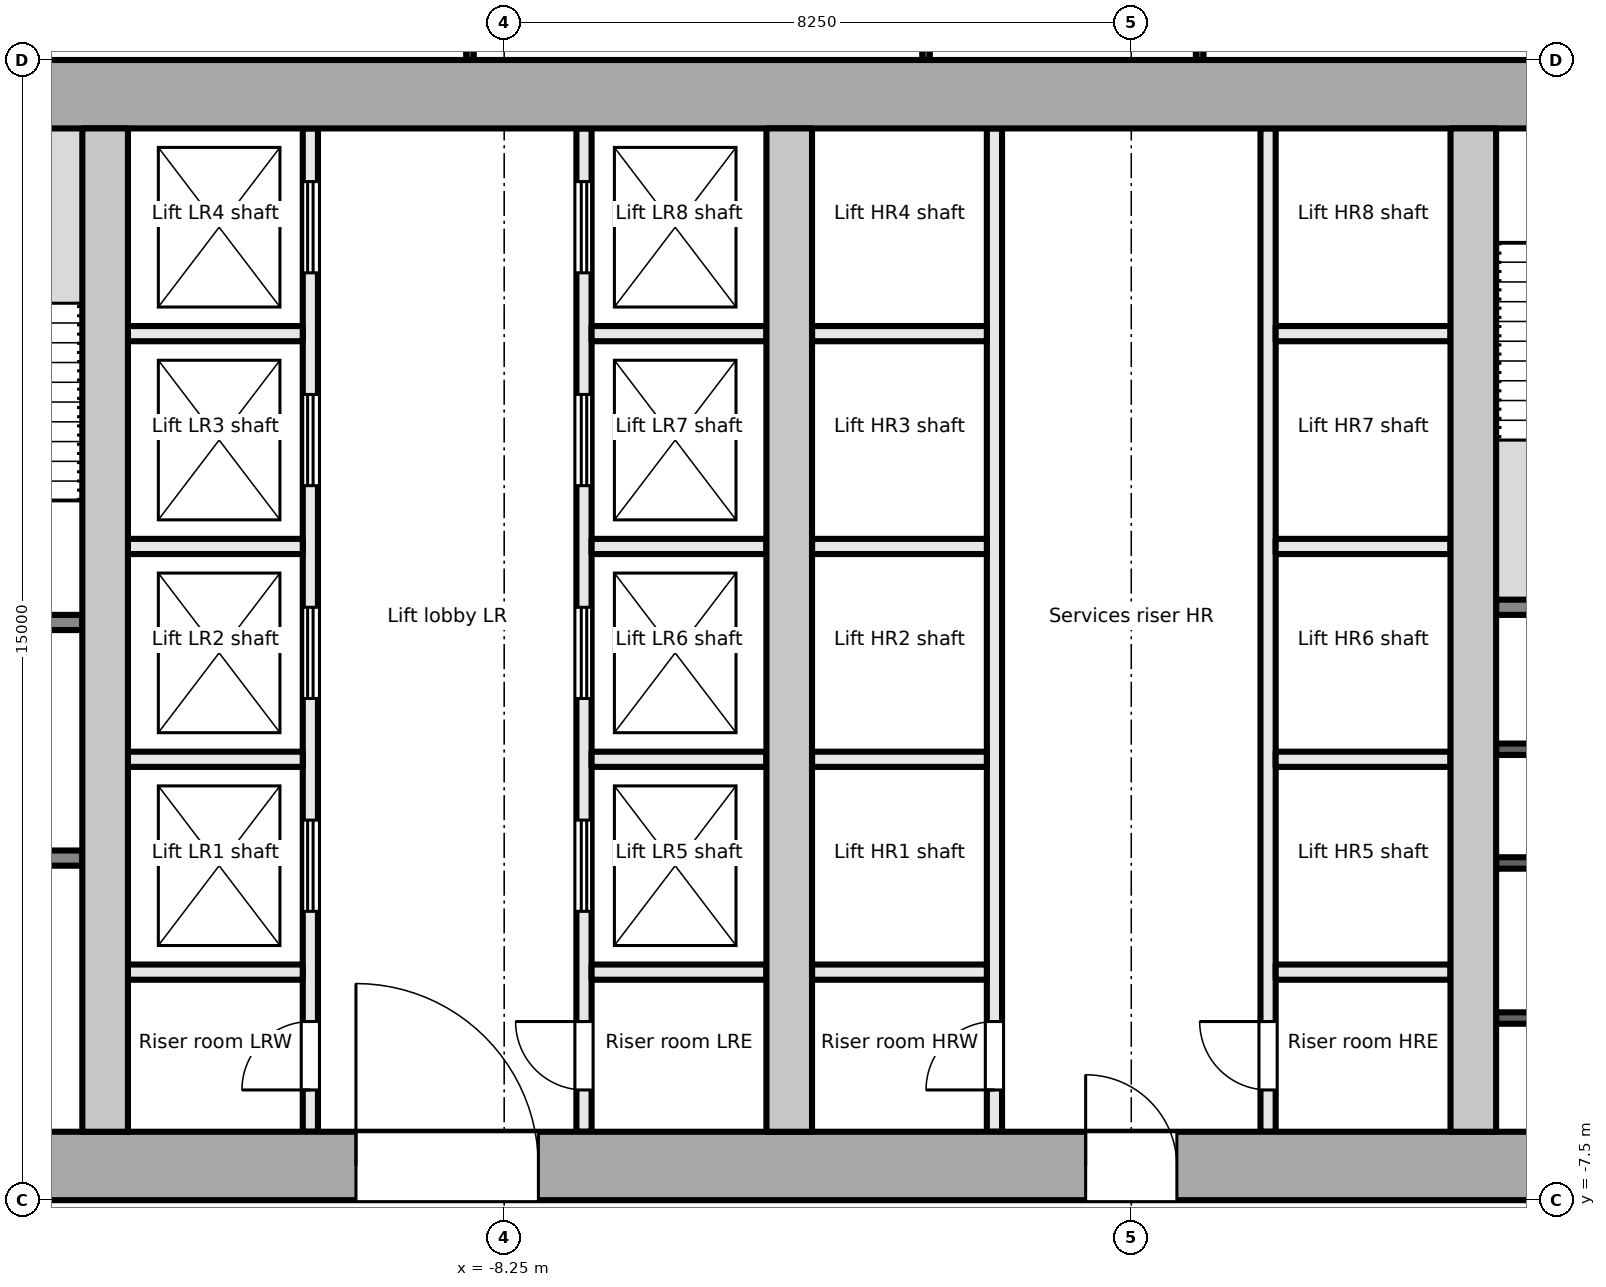
"""IFC4 building model, lengths in metres.
Left out: names, types, materials, properties, quantities, classifications, styles, units other than length and angle.
Written with IfcOpenShell. Run it as: python <this file> out.ifc"""

import sys

from ifc_helpers import new_model, si_unit, direction, frame, frame_2d, origin, place, context, subcontext, project, spatial, rectangle, extrude, element, fill, save


model = new_model("IFC4")
c1 = context("Model", 3, precision=1e-05, world=origin(), true_north=direction((0.0, 1.0)))
c2 = subcontext(c1, "Body", "Model", "MODEL_VIEW")
j1 = project(units=[si_unit("LENGTHUNIT", "METRE"), si_unit("PLANEANGLEUNIT", "RADIAN")], contexts=[c1])
p1 = place(None, origin())
s1 = spatial("IfcSite", under=j1, at=p1, CompositionType="ELEMENT")
p2 = place(p1, origin())
s2 = spatial("IfcBuilding", under=s1, at=p2, CompositionType="ELEMENT")
p3 = place(p2, frame((0.0, 0.0, 126.1)))
s3 = spatial("IfcBuildingStorey", under=s2, at=p3, CompositionType="ELEMENT", Elevation=126.1)
p4 = place(p3, frame((-18.0, -7.05, -0.2), z_axis=(0.0, 0.0, 1.0), x_axis=(1.0, 0.0, 0.0)))
e1 = element("IfcWall", 1, at=p4, inside=s3, PredefinedType="SHEAR", context=c2, shape_type="SweptSolid", body=[
    extrude(rectangle(XDim=36.0, YDim=0.9, at=frame_2d((18.0, 0.0))), origin(), (0.0, 0.0, 1.0), 4.0),
])
p5 = place(p4, frame((7.8, 0.0, 0.2)))
e2 = element("IfcOpeningElement", 2, at=p5, cuts=e1, PredefinedType="OPENING", context=c2, shape_type="SweptSolid", body=[
    extrude(rectangle(XDim=2.4, YDim=2.1, at=frame_2d((1.2, 1.05))), frame((0.0, 0.46, 0.0), z_axis=(0.0, -1.0, 0.0), x_axis=(1.0, 0.0, 0.0)), (0.0, 0.0, 1.0), 0.921),
])
p6 = place(p4, frame((17.4, 0.0, 0.2)))
e3 = element("IfcOpeningElement", 3, at=p6, cuts=e1, PredefinedType="OPENING", context=c2, shape_type="SweptSolid", body=[
    extrude(rectangle(XDim=1.2, YDim=2.1, at=frame_2d((0.6, 1.05))), frame((0.0, 0.46, 0.0), z_axis=(0.0, -1.0, 0.0), x_axis=(1.0, 0.0, 0.0)), (0.0, 0.0, 1.0), 0.921),
])
p7 = place(p4, frame((26.1, 0.0, 0.2)))
e4 = element("IfcOpeningElement", 4, at=p7, cuts=e1, PredefinedType="OPENING", context=c2, shape_type="SweptSolid", body=[
    extrude(rectangle(XDim=2.4, YDim=2.1, at=frame_2d((1.2, 1.05))), frame((0.0, 0.46, 0.0), z_axis=(0.0, -1.0, 0.0), x_axis=(1.0, 0.0, 0.0)), (0.0, 0.0, 1.0), 0.921),
])
p8 = place(p3, frame((-18.0, 7.05, -0.2), z_axis=(0.0, 0.0, 1.0), x_axis=(1.0, 0.0, 0.0)))
e5 = element("IfcWall", 5, at=p8, inside=s3, PredefinedType="SHEAR", context=c2, shape_type="SweptSolid", body=[
    extrude(rectangle(XDim=36.0, YDim=0.9, at=frame_2d((18.0, 0.0))), origin(), (0.0, 0.0, 1.0), 4.0),
])
for number, where, z_axis, x_axis in (
    (6, (-13.5, -6.6, -0.2), (0.0, 0.0, 1.0), (0.0, 1.0, 0.0)),
    (7, (-4.5, -6.6, -0.2), (0.0, 0.0, 1.0), (0.0, 1.0, 0.0)),
    (8, (4.5, -6.6, -0.2), (0.0, 0.0, 1.0), (0.0, 1.0, 0.0)),
):
    element("IfcWall", number, at=place(p3, frame(where, z_axis=z_axis, x_axis=x_axis)), inside=s3, PredefinedType="SHEAR", context=c2, shape_type="SweptSolid", body=[
        extrude(rectangle(XDim=13.2, YDim=0.6, at=frame_2d((6.6, 0.0))), origin(), (0.0, 0.0, 1.0), 4.0),
    ])
p9 = place(p3, frame((-17.1, -3.0, 0.0), z_axis=(0.0, 0.0, 1.0), x_axis=(1.0, 0.0, 0.0)))
e9 = element("IfcWall", 9, at=p9, inside=s3, PredefinedType="PARTITIONING", context=c2, shape_type="SweptSolid", body=[
    extrude(rectangle(XDim=3.3, YDim=0.2, at=frame_2d((1.65, 0.0))), origin(), (0.0, 0.0, 1.0), 3.8),
])
p10 = place(p9, frame((1.1, 0.0, 0.0)))
e10 = element("IfcOpeningElement", 10, at=p10, cuts=e9, PredefinedType="OPENING", context=c2, shape_type="SweptSolid", body=[
    extrude(rectangle(XDim=1.1, YDim=2.1, at=frame_2d((0.55, 1.05))), frame((0.0, 0.111, 0.0), z_axis=(0.0, -1.0, 0.0), x_axis=(1.0, 0.0, 0.0)), (0.0, 0.0, 1.0), 0.221),
])
p11 = place(p3, frame((-17.1, 0.1, 0.0), z_axis=(0.0, 0.0, 1.0), x_axis=(1.0, 0.0, 0.0)))
e11 = element("IfcWall", 11, at=p11, inside=s3, PredefinedType="PARTITIONING", context=c2, shape_type="SweptSolid", body=[
    extrude(rectangle(XDim=3.3, YDim=0.2, at=frame_2d((1.65, 0.0))), origin(), (0.0, 0.0, 1.0), 3.8),
])
p12 = place(p11, frame((1.1, 0.0, 0.0)))
e12 = element("IfcOpeningElement", 12, at=p12, cuts=e11, PredefinedType="OPENING", context=c2, shape_type="SweptSolid", body=[
    extrude(rectangle(XDim=1.1, YDim=2.1, at=frame_2d((0.55, 1.05))), frame((0.0, 0.111, 0.0), z_axis=(0.0, -1.0, 0.0), x_axis=(1.0, 0.0, 0.0)), (0.0, 0.0, 1.0), 0.221),
])
p13 = place(p3, frame((-10.8, -6.6, 0.0), z_axis=(0.0, 0.0, 1.0), x_axis=(0.0, 1.0, 0.0)))
e13 = element("IfcWall", 13, at=p13, inside=s3, PredefinedType="PARTITIONING", context=c2, shape_type="SweptSolid", body=[
    extrude(rectangle(XDim=13.2, YDim=0.2, at=frame_2d((6.6, 0.0))), origin(), (0.0, 0.0, 1.0), 3.8),
])
p14 = place(p13, frame((0.55, 0.0, 0.0)))
e14 = element("IfcOpeningElement", 14, at=p14, cuts=e13, PredefinedType="OPENING", context=c2, shape_type="SweptSolid", body=[
    extrude(rectangle(XDim=0.9, YDim=2.1, at=frame_2d((0.45, 1.05))), frame((0.0, 0.111, 0.0), z_axis=(0.0, -1.0, 0.0), x_axis=(1.0, 0.0, 0.0)), (0.0, 0.0, 1.0), 0.221),
])
p15 = place(p13, frame((2.9, 0.0, 0.0)))
e15 = element("IfcOpeningElement", 15, at=p15, cuts=e13, PredefinedType="OPENING", context=c2, shape_type="SweptSolid", body=[
    extrude(rectangle(XDim=1.2, YDim=2.1, at=frame_2d((0.6, 1.05))), frame((0.0, 0.111, 0.0), z_axis=(0.0, -1.0, 0.0), x_axis=(1.0, 0.0, 0.0)), (0.0, 0.0, 1.0), 0.221),
])
p16 = place(p13, frame((5.7, 0.0, 0.0)))
e16 = element("IfcOpeningElement", 16, at=p16, cuts=e13, PredefinedType="OPENING", context=c2, shape_type="SweptSolid", body=[
    extrude(rectangle(XDim=1.2, YDim=2.1, at=frame_2d((0.6, 1.05))), frame((0.0, 0.111, 0.0), z_axis=(0.0, -1.0, 0.0), x_axis=(1.0, 0.0, 0.0)), (0.0, 0.0, 1.0), 0.221),
])
p17 = place(p13, frame((8.5, 0.0, 0.0)))
e17 = element("IfcOpeningElement", 17, at=p17, cuts=e13, PredefinedType="OPENING", context=c2, shape_type="SweptSolid", body=[
    extrude(rectangle(XDim=1.2, YDim=2.1, at=frame_2d((0.6, 1.05))), frame((0.0, 0.111, 0.0), z_axis=(0.0, -1.0, 0.0), x_axis=(1.0, 0.0, 0.0)), (0.0, 0.0, 1.0), 0.221),
])
p18 = place(p13, frame((11.3, 0.0, 0.0)))
e18 = element("IfcOpeningElement", 18, at=p18, cuts=e13, PredefinedType="OPENING", context=c2, shape_type="SweptSolid", body=[
    extrude(rectangle(XDim=1.2, YDim=2.1, at=frame_2d((0.6, 1.05))), frame((0.0, 0.111, 0.0), z_axis=(0.0, -1.0, 0.0), x_axis=(1.0, 0.0, 0.0)), (0.0, 0.0, 1.0), 0.221),
])
p19 = place(p3, frame((-7.2, -6.6, 0.0), z_axis=(0.0, 0.0, 1.0), x_axis=(0.0, 1.0, 0.0)))
e19 = element("IfcWall", 19, at=p19, inside=s3, PredefinedType="PARTITIONING", context=c2, shape_type="SweptSolid", body=[
    extrude(rectangle(XDim=13.2, YDim=0.2, at=frame_2d((6.6, 0.0))), origin(), (0.0, 0.0, 1.0), 3.8),
])
p20 = place(p19, frame((0.55, 0.0, 0.0)))
e20 = element("IfcOpeningElement", 20, at=p20, cuts=e19, PredefinedType="OPENING", context=c2, shape_type="SweptSolid", body=[
    extrude(rectangle(XDim=0.9, YDim=2.1, at=frame_2d((0.45, 1.05))), frame((0.0, 0.111, 0.0), z_axis=(0.0, -1.0, 0.0), x_axis=(1.0, 0.0, 0.0)), (0.0, 0.0, 1.0), 0.221),
])
p21 = place(p19, frame((2.9, 0.0, 0.0)))
e21 = element("IfcOpeningElement", 21, at=p21, cuts=e19, PredefinedType="OPENING", context=c2, shape_type="SweptSolid", body=[
    extrude(rectangle(XDim=1.2, YDim=2.1, at=frame_2d((0.6, 1.05))), frame((0.0, 0.111, 0.0), z_axis=(0.0, -1.0, 0.0), x_axis=(1.0, 0.0, 0.0)), (0.0, 0.0, 1.0), 0.221),
])
p22 = place(p19, frame((5.7, 0.0, 0.0)))
e22 = element("IfcOpeningElement", 22, at=p22, cuts=e19, PredefinedType="OPENING", context=c2, shape_type="SweptSolid", body=[
    extrude(rectangle(XDim=1.2, YDim=2.1, at=frame_2d((0.6, 1.05))), frame((0.0, 0.111, 0.0), z_axis=(0.0, -1.0, 0.0), x_axis=(1.0, 0.0, 0.0)), (0.0, 0.0, 1.0), 0.221),
])
p23 = place(p19, frame((8.5, 0.0, 0.0)))
e23 = element("IfcOpeningElement", 23, at=p23, cuts=e19, PredefinedType="OPENING", context=c2, shape_type="SweptSolid", body=[
    extrude(rectangle(XDim=1.2, YDim=2.1, at=frame_2d((0.6, 1.05))), frame((0.0, 0.111, 0.0), z_axis=(0.0, -1.0, 0.0), x_axis=(1.0, 0.0, 0.0)), (0.0, 0.0, 1.0), 0.221),
])
p24 = place(p19, frame((11.3, 0.0, 0.0)))
e24 = element("IfcOpeningElement", 24, at=p24, cuts=e19, PredefinedType="OPENING", context=c2, shape_type="SweptSolid", body=[
    extrude(rectangle(XDim=1.2, YDim=2.1, at=frame_2d((0.6, 1.05))), frame((0.0, 0.111, 0.0), z_axis=(0.0, -1.0, 0.0), x_axis=(1.0, 0.0, 0.0)), (0.0, 0.0, 1.0), 0.221),
])
for number, where, z_axis, x_axis in (
    (25, (-13.2, -1.7, 0.0), (0.0, 0.0, 1.0), (1.0, 0.0, 0.0)),
    (26, (-13.2, 1.1, 0.0), (0.0, 0.0, 1.0), (1.0, 0.0, 0.0)),
    (27, (-13.2, 3.9, 0.0), (0.0, 0.0, 1.0), (1.0, 0.0, 0.0)),
    (28, (-13.2, -4.5, 0.0), (0.0, 0.0, 1.0), (1.0, 0.0, 0.0)),
    (29, (-7.1, -1.7, 0.0), (0.0, 0.0, 1.0), (1.0, 0.0, 0.0)),
    (30, (-7.1, 1.1, 0.0), (0.0, 0.0, 1.0), (1.0, 0.0, 0.0)),
    (31, (-7.1, 3.9, 0.0), (0.0, 0.0, 1.0), (1.0, 0.0, 0.0)),
    (32, (-7.1, -4.5, 0.0), (0.0, 0.0, 1.0), (1.0, 0.0, 0.0)),
):
    element("IfcWall", number, at=place(p3, frame(where, z_axis=z_axis, x_axis=x_axis)), inside=s3, PredefinedType="PARTITIONING", context=c2, shape_type="SweptSolid", body=[
        extrude(rectangle(XDim=2.3, YDim=0.2, at=frame_2d((1.15, 0.0))), origin(), (0.0, 0.0, 1.0), 3.8),
    ])
p25 = place(p3, frame((-1.8, -6.6, 0.0), z_axis=(0.0, 0.0, 1.0), x_axis=(0.0, 1.0, 0.0)))
e33 = element("IfcWall", 33, at=p25, inside=s3, PredefinedType="PARTITIONING", context=c2, shape_type="SweptSolid", body=[
    extrude(rectangle(XDim=13.2, YDim=0.2, at=frame_2d((6.6, 0.0))), origin(), (0.0, 0.0, 1.0), 3.8),
])
p26 = place(p25, frame((0.55, 0.0, 0.0)))
e34 = element("IfcOpeningElement", 34, at=p26, cuts=e33, PredefinedType="OPENING", context=c2, shape_type="SweptSolid", body=[
    extrude(rectangle(XDim=0.9, YDim=2.1, at=frame_2d((0.45, 1.05))), frame((0.0, 0.111, 0.0), z_axis=(0.0, -1.0, 0.0), x_axis=(1.0, 0.0, 0.0)), (0.0, 0.0, 1.0), 0.221),
])
p27 = place(p3, frame((1.8, -6.6, 0.0), z_axis=(0.0, 0.0, 1.0), x_axis=(0.0, 1.0, 0.0)))
e35 = element("IfcWall", 35, at=p27, inside=s3, PredefinedType="PARTITIONING", context=c2, shape_type="SweptSolid", body=[
    extrude(rectangle(XDim=13.2, YDim=0.2, at=frame_2d((6.6, 0.0))), origin(), (0.0, 0.0, 1.0), 3.8),
])
p28 = place(p27, frame((0.55, 0.0, 0.0)))
e36 = element("IfcOpeningElement", 36, at=p28, cuts=e35, PredefinedType="OPENING", context=c2, shape_type="SweptSolid", body=[
    extrude(rectangle(XDim=0.9, YDim=2.1, at=frame_2d((0.45, 1.05))), frame((0.0, 0.111, 0.0), z_axis=(0.0, -1.0, 0.0), x_axis=(1.0, 0.0, 0.0)), (0.0, 0.0, 1.0), 0.221),
])
for number, where, z_axis, x_axis in (
    (37, (-4.2, -1.7, 0.0), (0.0, 0.0, 1.0), (1.0, 0.0, 0.0)),
    (38, (-4.2, 1.1, 0.0), (0.0, 0.0, 1.0), (1.0, 0.0, 0.0)),
    (39, (-4.2, 3.9, 0.0), (0.0, 0.0, 1.0), (1.0, 0.0, 0.0)),
    (40, (-4.2, -4.5, 0.0), (0.0, 0.0, 1.0), (1.0, 0.0, 0.0)),
    (41, (1.9, -1.7, 0.0), (0.0, 0.0, 1.0), (1.0, 0.0, 0.0)),
    (42, (1.9, 1.1, 0.0), (0.0, 0.0, 1.0), (1.0, 0.0, 0.0)),
    (43, (1.9, 3.9, 0.0), (0.0, 0.0, 1.0), (1.0, 0.0, 0.0)),
    (44, (1.9, -4.5, 0.0), (0.0, 0.0, 1.0), (1.0, 0.0, 0.0)),
):
    element("IfcWall", number, at=place(p3, frame(where, z_axis=z_axis, x_axis=x_axis)), inside=s3, PredefinedType="PARTITIONING", context=c2, shape_type="SweptSolid", body=[
        extrude(rectangle(XDim=2.3, YDim=0.2, at=frame_2d((1.15, 0.0))), origin(), (0.0, 0.0, 1.0), 3.8),
    ])
p29 = place(p3, frame((4.8, 0.3, 0.0), z_axis=(0.0, 0.0, 1.0), x_axis=(1.0, 0.0, 0.0)))
e45 = element("IfcWall", 45, at=p29, inside=s3, PredefinedType="PARTITIONING", context=c2, shape_type="SweptSolid", body=[
    extrude(rectangle(XDim=3.15, YDim=0.2, at=frame_2d((1.575, 0.0))), origin(), (0.0, 0.0, 1.0), 3.8),
])
for number, where, z_axis, x_axis in (
    (46, (4.8, -5.104, 0.0), (0.0, 0.0, 1.0), (1.0, 0.0, 0.0)),
    (47, (4.8, -3.064, 0.0), (0.0, 0.0, 1.0), (1.0, 0.0, 0.0)),
    (48, (4.8, -1.568, 0.0), (0.0, 0.0, 1.0), (1.0, 0.0, 0.0)),
):
    element("IfcWall", number, at=place(p3, frame(where, z_axis=z_axis, x_axis=x_axis)), inside=s3, PredefinedType="PARTITIONING", context=c2, shape_type="SweptSolid", body=[
        extrude(rectangle(XDim=3.15, YDim=0.15, at=frame_2d((1.575, 0.0))), origin(), (0.0, 0.0, 1.0), 3.8),
    ])
p30 = place(p3, frame((-8.7, 7.5, 0.0), z_axis=(0.0, 0.0, 1.0), x_axis=(0.0, 1.0, 0.0)))
e49 = element("IfcWall", 49, at=p30, inside=s3, PredefinedType="PARTITIONING", context=c2, shape_type="SweptSolid", body=[
    extrude(rectangle(XDim=2.95, YDim=0.1, at=frame_2d((1.475, 0.0))), origin(), (0.0, 0.0, 1.0), 3.8),
])
p31 = place(p30, frame((0.575, 0.0, 0.9)))
e50 = element("IfcOpeningElement", 50, at=p31, cuts=e49, PredefinedType="OPENING", context=c2, shape_type="SweptSolid", body=[
    extrude(rectangle(XDim=1.8, YDim=1.2, at=frame_2d((0.9, 0.6))), frame((0.0, 0.061, 0.0), z_axis=(0.0, -1.0, 0.0), x_axis=(1.0, 0.0, 0.0)), (0.0, 0.0, 1.0), 0.121),
])
for number, where, z_axis, x_axis in (
    (51, (-2.7, 10.45, 0.0), (0.0, 0.0, 1.0), (0.0, -1.0, 0.0)),
    (52, (0.9, 10.45, 0.0), (0.0, 0.0, 1.0), (0.0, -1.0, 0.0)),
):
    element("IfcWall", number, at=place(p3, frame(where, z_axis=z_axis, x_axis=x_axis)), inside=s3, PredefinedType="PARTITIONING", context=c2, shape_type="SweptSolid", body=[
        extrude(rectangle(XDim=2.95, YDim=0.1, at=frame_2d((1.475, 0.0))), origin(), (0.0, 0.0, 1.0), 3.8),
    ])
p32 = place(p14, origin())
e53 = element("IfcDoor", 53, at=p32, inside=s3, OperationType="SINGLE_SWING_LEFT", PredefinedType="DOOR", context=c2, shape_type="SweptSolid", body=[
    extrude(rectangle(XDim=0.9, YDim=2.1, at=frame_2d((0.45, 1.05))), frame((0.0, 0.025, 0.0), z_axis=(0.0, -1.0, 0.0), x_axis=(1.0, 0.0, 0.0)), (0.0, 0.0, 1.0), 0.05),
])
fill(e14, e53)
p33 = place(p15, origin())
e54 = element("IfcDoor", 54, at=p33, inside=s3, OperationType="DOUBLE_DOOR_SLIDING", PredefinedType="DOOR", context=c2, shape_type="SweptSolid", body=[
    extrude(rectangle(XDim=1.2, YDim=2.1, at=frame_2d((0.6, 1.05))), frame((0.0, 0.025, 0.0), z_axis=(0.0, -1.0, 0.0), x_axis=(1.0, 0.0, 0.0)), (0.0, 0.0, 1.0), 0.05),
])
fill(e15, e54)
p34 = place(p16, origin())
e55 = element("IfcDoor", 55, at=p34, inside=s3, OperationType="DOUBLE_DOOR_SLIDING", PredefinedType="DOOR", context=c2, shape_type="SweptSolid", body=[
    extrude(rectangle(XDim=1.2, YDim=2.1, at=frame_2d((0.6, 1.05))), frame((0.0, 0.025, 0.0), z_axis=(0.0, -1.0, 0.0), x_axis=(1.0, 0.0, 0.0)), (0.0, 0.0, 1.0), 0.05),
])
fill(e16, e55)
p35 = place(p17, origin())
e56 = element("IfcDoor", 56, at=p35, inside=s3, OperationType="DOUBLE_DOOR_SLIDING", PredefinedType="DOOR", context=c2, shape_type="SweptSolid", body=[
    extrude(rectangle(XDim=1.2, YDim=2.1, at=frame_2d((0.6, 1.05))), frame((0.0, 0.025, 0.0), z_axis=(0.0, -1.0, 0.0), x_axis=(1.0, 0.0, 0.0)), (0.0, 0.0, 1.0), 0.05),
])
fill(e17, e56)
p36 = place(p18, origin())
e57 = element("IfcDoor", 57, at=p36, inside=s3, OperationType="DOUBLE_DOOR_SLIDING", PredefinedType="DOOR", context=c2, shape_type="SweptSolid", body=[
    extrude(rectangle(XDim=1.2, YDim=2.1, at=frame_2d((0.6, 1.05))), frame((0.0, 0.025, 0.0), z_axis=(0.0, -1.0, 0.0), x_axis=(1.0, 0.0, 0.0)), (0.0, 0.0, 1.0), 0.05),
])
fill(e18, e57)
p37 = place(p20, origin())
e58 = element("IfcDoor", 58, at=p37, inside=s3, OperationType="SINGLE_SWING_RIGHT", PredefinedType="DOOR", context=c2, shape_type="SweptSolid", body=[
    extrude(rectangle(XDim=0.9, YDim=2.1, at=frame_2d((0.45, 1.05))), frame((0.0, 0.025, 0.0), z_axis=(0.0, -1.0, 0.0), x_axis=(1.0, 0.0, 0.0)), (0.0, 0.0, 1.0), 0.05),
])
fill(e20, e58)
p38 = place(p21, origin())
e59 = element("IfcDoor", 59, at=p38, inside=s3, OperationType="DOUBLE_DOOR_SLIDING", PredefinedType="DOOR", context=c2, shape_type="SweptSolid", body=[
    extrude(rectangle(XDim=1.2, YDim=2.1, at=frame_2d((0.6, 1.05))), frame((0.0, 0.025, 0.0), z_axis=(0.0, -1.0, 0.0), x_axis=(1.0, 0.0, 0.0)), (0.0, 0.0, 1.0), 0.05),
])
fill(e21, e59)
p39 = place(p22, origin())
e60 = element("IfcDoor", 60, at=p39, inside=s3, OperationType="DOUBLE_DOOR_SLIDING", PredefinedType="DOOR", context=c2, shape_type="SweptSolid", body=[
    extrude(rectangle(XDim=1.2, YDim=2.1, at=frame_2d((0.6, 1.05))), frame((0.0, 0.025, 0.0), z_axis=(0.0, -1.0, 0.0), x_axis=(1.0, 0.0, 0.0)), (0.0, 0.0, 1.0), 0.05),
])
fill(e22, e60)
p40 = place(p23, origin())
e61 = element("IfcDoor", 61, at=p40, inside=s3, OperationType="DOUBLE_DOOR_SLIDING", PredefinedType="DOOR", context=c2, shape_type="SweptSolid", body=[
    extrude(rectangle(XDim=1.2, YDim=2.1, at=frame_2d((0.6, 1.05))), frame((0.0, 0.025, 0.0), z_axis=(0.0, -1.0, 0.0), x_axis=(1.0, 0.0, 0.0)), (0.0, 0.0, 1.0), 0.05),
])
fill(e23, e61)
p41 = place(p24, origin())
e62 = element("IfcDoor", 62, at=p41, inside=s3, OperationType="DOUBLE_DOOR_SLIDING", PredefinedType="DOOR", context=c2, shape_type="SweptSolid", body=[
    extrude(rectangle(XDim=1.2, YDim=2.1, at=frame_2d((0.6, 1.05))), frame((0.0, 0.025, 0.0), z_axis=(0.0, -1.0, 0.0), x_axis=(1.0, 0.0, 0.0)), (0.0, 0.0, 1.0), 0.05),
])
fill(e24, e62)
p42 = place(p5, origin())
e63 = element("IfcDoor", 63, at=p42, inside=s3, OperationType="DOUBLE_DOOR_DOUBLE_SWING", PredefinedType="DOOR", context=c2, shape_type="SweptSolid", body=[
    extrude(rectangle(XDim=2.4, YDim=2.1, at=frame_2d((1.2, 1.05))), frame((0.0, 0.025, 0.0), z_axis=(0.0, -1.0, 0.0), x_axis=(1.0, 0.0, 0.0)), (0.0, 0.0, 1.0), 0.05),
])
fill(e2, e63)
p43 = place(p26, origin())
e64 = element("IfcDoor", 64, at=p43, inside=s3, OperationType="SINGLE_SWING_LEFT", PredefinedType="DOOR", context=c2, shape_type="SweptSolid", body=[
    extrude(rectangle(XDim=0.9, YDim=2.1, at=frame_2d((0.45, 1.05))), frame((0.0, 0.025, 0.0), z_axis=(0.0, -1.0, 0.0), x_axis=(1.0, 0.0, 0.0)), (0.0, 0.0, 1.0), 0.05),
])
fill(e34, e64)
p44 = place(p28, origin())
e65 = element("IfcDoor", 65, at=p44, inside=s3, OperationType="SINGLE_SWING_RIGHT", PredefinedType="DOOR", context=c2, shape_type="SweptSolid", body=[
    extrude(rectangle(XDim=0.9, YDim=2.1, at=frame_2d((0.45, 1.05))), frame((0.0, 0.025, 0.0), z_axis=(0.0, -1.0, 0.0), x_axis=(1.0, 0.0, 0.0)), (0.0, 0.0, 1.0), 0.05),
])
fill(e36, e65)
p45 = place(p6, origin())
e66 = element("IfcDoor", 66, at=p45, inside=s3, OperationType="SINGLE_SWING_LEFT", PredefinedType="DOOR", context=c2, shape_type="SweptSolid", body=[
    extrude(rectangle(XDim=1.2, YDim=2.1, at=frame_2d((0.6, 1.05))), frame((0.0, 0.025, 0.0), z_axis=(0.0, -1.0, 0.0), x_axis=(1.0, 0.0, 0.0)), (0.0, 0.0, 1.0), 0.05),
])
fill(e3, e66)
save(model, sys.argv[1])
